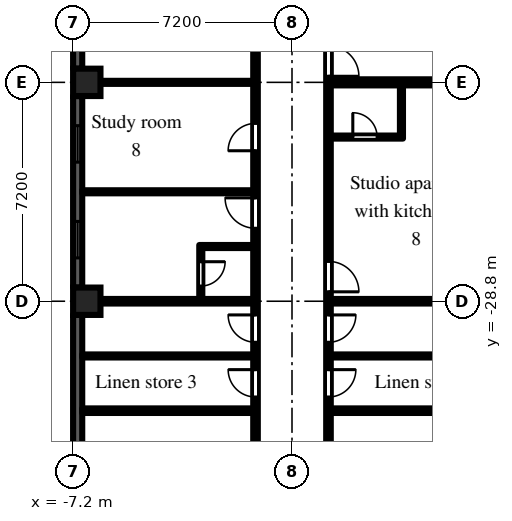
"""IFC4 building model, lengths in metres.
Left out: names, types, materials, properties, quantities, classifications, styles, units other than length and angle.
Written with IfcOpenShell. Run it as: python <this file> out.ifc"""

import sys

from ifc_helpers import new_model, si_unit, direction, frame, frame_2d, origin, origin_2d, place, context, subcontext, project, spatial, rectangle, extrude, element, fill, save


model = new_model("IFC4")
c1 = context("Model", 3, precision=1e-05, world=origin(), true_north=direction((0.0, 1.0)))
c2 = subcontext(c1, "Body", "Model", "MODEL_VIEW")
j1 = project(units=[si_unit("LENGTHUNIT", "METRE"), si_unit("PLANEANGLEUNIT", "RADIAN")], contexts=[c1])
p1 = place(None, origin())
s1 = spatial("IfcSite", under=j1, at=p1, CompositionType="ELEMENT")
p2 = place(p1, origin())
s2 = spatial("IfcBuilding", under=s1, at=p2, CompositionType="ELEMENT")
p3 = place(p2, frame((0.0, 0.0, 35.7)))
s3 = spatial("IfcBuildingStorey", under=s2, at=p3, CompositionType="ELEMENT", Elevation=35.7)
for number, where, z_axis, x_axis in (
    (1, (-6.75, -28.8, 0.0), (0.0, 0.0, 1.0), (1.0, 0.0, 0.0)),
    (2, (-6.75, -21.6, 0.0), (0.0, 0.0, 1.0), (1.0, 0.0, 0.0)),
):
    element("IfcColumn", number, at=place(p3, frame(where, z_axis=z_axis, x_axis=x_axis)), inside=s3, PredefinedType="COLUMN", context=c2, shape_type="SweptSolid", body=[
        extrude(rectangle(XDim=0.9, YDim=0.9, at=origin_2d()), origin(), (0.0, 0.0, 1.0), 3.0),
    ])
p4 = place(p3, frame((-7.05, -18.0, 0.0), z_axis=(0.0, 0.0, 1.0), x_axis=(0.0, -1.0, 0.0)))
e3 = element("IfcWall", 3, at=p4, inside=s3, PredefinedType="SOLIDWALL", context=c2, shape_type="SweptSolid", body=[
    extrude(rectangle(XDim=3.15, YDim=0.3, at=frame_2d((1.575, 0.0))), origin(), (0.0, 0.0, 1.0), 2.1),
])
p5 = place(p4, frame((0.975, 0.0, 0.2)))
e4 = element("IfcOpeningElement", 4, at=p5, cuts=e3, PredefinedType="OPENING", context=c2, shape_type="SweptSolid", body=[
    extrude(rectangle(XDim=1.2, YDim=1.85, at=frame_2d((0.6, 0.925))), frame((0.0, 0.16, 0.0), z_axis=(0.0, -1.0, 0.0), x_axis=(1.0, 0.0, 0.0)), (0.0, 0.0, 1.0), 0.32),
])
p6 = place(p3, frame((-7.05, -22.05, 0.0), z_axis=(0.0, 0.0, 1.0), x_axis=(0.0, -1.0, 0.0)))
e5 = element("IfcWall", 5, at=p6, inside=s3, PredefinedType="SOLIDWALL", context=c2, shape_type="SweptSolid", body=[
    extrude(rectangle(XDim=6.3, YDim=0.3, at=frame_2d((3.15, 0.0))), origin(), (0.0, 0.0, 1.0), 2.1),
])
p7 = place(p6, frame((0.975, 0.0, 0.2)))
e6 = element("IfcOpeningElement", 6, at=p7, cuts=e5, PredefinedType="OPENING", context=c2, shape_type="SweptSolid", body=[
    extrude(rectangle(XDim=1.2, YDim=1.85, at=frame_2d((0.6, 0.925))), frame((0.0, 0.16, 0.0), z_axis=(0.0, -1.0, 0.0), x_axis=(1.0, 0.0, 0.0)), (0.0, 0.0, 1.0), 0.32),
])
p8 = place(p6, frame((4.125, 0.0, 0.2)))
e7 = element("IfcOpeningElement", 7, at=p8, cuts=e5, PredefinedType="OPENING", context=c2, shape_type="SweptSolid", body=[
    extrude(rectangle(XDim=1.2, YDim=1.85, at=frame_2d((0.6, 0.925))), frame((0.0, 0.16, 0.0), z_axis=(0.0, -1.0, 0.0), x_axis=(1.0, 0.0, 0.0)), (0.0, 0.0, 1.0), 0.32),
])
p9 = place(p3, frame((-7.05, -29.25, 0.0), z_axis=(0.0, 0.0, 1.0), x_axis=(0.0, -1.0, 0.0)))
e8 = element("IfcWall", 8, at=p9, inside=s3, PredefinedType="SOLIDWALL", context=c2, shape_type="SweptSolid", body=[
    extrude(rectangle(XDim=6.3, YDim=0.3, at=frame_2d((3.15, 0.0))), origin(), (0.0, 0.0, 1.0), 2.1),
])
p10 = place(p3, frame((-6.9, -32.4, 0.0), z_axis=(0.0, 0.0, 1.0), x_axis=(1.0, 0.0, 0.0)))
e9 = element("IfcWall", 9, at=p10, inside=s3, PredefinedType="PARTITIONING", context=c2, shape_type="SweptSolid", body=[
    extrude(rectangle(XDim=5.625, YDim=0.15, at=frame_2d((2.812, 0.0))), origin(), (0.0, 0.0, 1.0), 2.575),
])
p11 = place(p3, frame((-6.9, -30.6, 0.0), z_axis=(0.0, 0.0, 1.0), x_axis=(1.0, 0.0, 0.0)))
e10 = element("IfcWall", 10, at=p11, inside=s3, PredefinedType="PARTITIONING", context=c2, shape_type="SweptSolid", body=[
    extrude(rectangle(XDim=5.625, YDim=0.1, at=frame_2d((2.812, 0.0))), origin(), (0.0, 0.0, 1.0), 2.575),
])
p12 = place(p3, frame((-6.9, -28.8, 0.0), z_axis=(0.0, 0.0, 1.0), x_axis=(1.0, 0.0, 0.0)))
e11 = element("IfcWall", 11, at=p12, inside=s3, PredefinedType="PARTITIONING", context=c2, shape_type="SweptSolid", body=[
    extrude(rectangle(XDim=5.625, YDim=0.15, at=frame_2d((2.812, 0.0))), origin(), (0.0, 0.0, 1.0), 2.575),
])
for number, where, z_axis, x_axis in (
    (12, (-6.9, -25.2, 0.0), (0.0, 0.0, 1.0), (1.0, 0.0, 0.0)),
    (13, (-6.9, -21.6, 0.0), (0.0, 0.0, 1.0), (1.0, 0.0, 0.0)),
):
    element("IfcWall", number, at=place(p3, frame(where, z_axis=z_axis, x_axis=x_axis)), inside=s3, PredefinedType="PARTITIONING", context=c2, shape_type="SweptSolid", body=[
        extrude(rectangle(XDim=5.625, YDim=0.1, at=frame_2d((2.812, 0.0))), origin(), (0.0, 0.0, 1.0), 2.575),
    ])
p13 = place(p3, frame((-3.0, -28.725, 0.0), z_axis=(0.0, 0.0, 1.0), x_axis=(0.0, 1.0, 0.0)))
e14 = element("IfcWall", 14, at=p13, inside=s3, PredefinedType="PARTITIONING", context=c2, shape_type="SweptSolid", body=[
    extrude(rectangle(XDim=1.775, YDim=0.1, at=frame_2d((0.888, 0.0))), origin(), (0.0, 0.0, 1.0), 2.575),
])
p14 = place(p13, frame((0.425, 0.0, 0.0)))
e15 = element("IfcOpeningElement", 15, at=p14, cuts=e14, PredefinedType="OPENING", context=c2, shape_type="SweptSolid", body=[
    extrude(rectangle(XDim=0.8, YDim=2.1, at=frame_2d((0.4, 1.05))), frame((0.0, 0.06, 0.0), z_axis=(0.0, -1.0, 0.0), x_axis=(1.0, 0.0, 0.0)), (0.0, 0.0, 1.0), 0.12),
])
p15 = place(p3, frame((-2.95, -27.0, 0.0), z_axis=(0.0, 0.0, 1.0), x_axis=(1.0, 0.0, 0.0)))
e16 = element("IfcWall", 16, at=p15, inside=s3, PredefinedType="PARTITIONING", context=c2, shape_type="SweptSolid", body=[
    extrude(rectangle(XDim=1.675, YDim=0.1, at=frame_2d((0.837, 0.0))), origin(), (0.0, 0.0, 1.0), 2.575),
])
p16 = place(p3, frame((-1.2, -36.5, 0.0), z_axis=(0.0, 0.0, 1.0), x_axis=(0.0, 1.0, 0.0)))
e17 = element("IfcWall", 17, at=p16, inside=s3, PredefinedType="PARTITIONING", context=c2, shape_type="SweptSolid", body=[
    extrude(rectangle(XDim=35.225, YDim=0.15, at=frame_2d((17.613, 0.0))), origin(), (0.0, 0.0, 1.0), 2.575),
])
p17 = place(p16, frame((33.65, 0.0, 0.0)))
e18 = element("IfcOpeningElement", 18, at=p17, cuts=e17, PredefinedType="OPENING", context=c2, shape_type="SweptSolid", body=[
    extrude(rectangle(XDim=0.9, YDim=2.1, at=frame_2d((0.45, 1.05))), frame((0.0, 0.085, 0.0), z_axis=(0.0, -1.0, 0.0), x_axis=(1.0, 0.0, 0.0)), (0.0, 0.0, 1.0), 0.17),
])
p18 = place(p16, frame((30.65, 0.0, 0.0)))
e19 = element("IfcOpeningElement", 19, at=p18, cuts=e17, PredefinedType="OPENING", context=c2, shape_type="SweptSolid", body=[
    extrude(rectangle(XDim=0.9, YDim=2.1, at=frame_2d((0.45, 1.05))), frame((0.0, 0.085, 0.0), z_axis=(0.0, -1.0, 0.0), x_axis=(1.0, 0.0, 0.0)), (0.0, 0.0, 1.0), 0.17),
])
p19 = place(p16, frame((23.05, 0.0, 0.0)))
e20 = element("IfcOpeningElement", 20, at=p19, cuts=e17, PredefinedType="OPENING", context=c2, shape_type="SweptSolid", body=[
    extrude(rectangle(XDim=0.9, YDim=2.1, at=frame_2d((0.45, 1.05))), frame((0.0, 0.085, 0.0), z_axis=(0.0, -1.0, 0.0), x_axis=(1.0, 0.0, 0.0)), (0.0, 0.0, 1.0), 0.17),
])
p20 = place(p16, frame((26.65, 0.0, 0.0)))
e21 = element("IfcOpeningElement", 21, at=p20, cuts=e17, PredefinedType="OPENING", context=c2, shape_type="SweptSolid", body=[
    extrude(rectangle(XDim=0.9, YDim=2.1, at=frame_2d((0.45, 1.05))), frame((0.0, 0.085, 0.0), z_axis=(0.0, -1.0, 0.0), x_axis=(1.0, 0.0, 0.0)), (0.0, 0.0, 1.0), 0.17),
])
p21 = place(p16, frame((17.3, 0.0, 0.0)))
e22 = element("IfcOpeningElement", 22, at=p21, cuts=e17, PredefinedType="OPENING", context=c2, shape_type="SweptSolid", body=[
    extrude(rectangle(XDim=1.0, YDim=2.1, at=frame_2d((0.5, 1.05))), frame((0.0, 0.085, 0.0), z_axis=(0.0, -1.0, 0.0), x_axis=(1.0, 0.0, 0.0)), (0.0, 0.0, 1.0), 0.17),
])
p22 = place(p16, frame((12.65, 0.0, 0.0)))
e23 = element("IfcOpeningElement", 23, at=p22, cuts=e17, PredefinedType="OPENING", context=c2, shape_type="SweptSolid", body=[
    extrude(rectangle(XDim=0.9, YDim=2.1, at=frame_2d((0.45, 1.05))), frame((0.0, 0.085, 0.0), z_axis=(0.0, -1.0, 0.0), x_axis=(1.0, 0.0, 0.0)), (0.0, 0.0, 1.0), 0.17),
])
p23 = place(p16, frame((10.1, 0.0, 0.0)))
e24 = element("IfcOpeningElement", 24, at=p23, cuts=e17, PredefinedType="OPENING", context=c2, shape_type="SweptSolid", body=[
    extrude(rectangle(XDim=1.0, YDim=2.1, at=frame_2d((0.5, 1.05))), frame((0.0, 0.085, 0.0), z_axis=(0.0, -1.0, 0.0), x_axis=(1.0, 0.0, 0.0)), (0.0, 0.0, 1.0), 0.17),
])
p24 = place(p16, frame((6.35, 0.0, 0.0)))
e25 = element("IfcOpeningElement", 25, at=p24, cuts=e17, PredefinedType="OPENING", context=c2, shape_type="SweptSolid", body=[
    extrude(rectangle(XDim=0.9, YDim=2.1, at=frame_2d((0.45, 1.05))), frame((0.0, 0.085, 0.0), z_axis=(0.0, -1.0, 0.0), x_axis=(1.0, 0.0, 0.0)), (0.0, 0.0, 1.0), 0.17),
])
p25 = place(p16, frame((4.55, 0.0, 0.0)))
e26 = element("IfcOpeningElement", 26, at=p25, cuts=e17, PredefinedType="OPENING", context=c2, shape_type="SweptSolid", body=[
    extrude(rectangle(XDim=0.9, YDim=2.1, at=frame_2d((0.45, 1.05))), frame((0.0, 0.085, 0.0), z_axis=(0.0, -1.0, 0.0), x_axis=(1.0, 0.0, 0.0)), (0.0, 0.0, 1.0), 0.17),
])
p26 = place(p16, frame((1.15, 0.0, 0.0)))
e27 = element("IfcOpeningElement", 27, at=p26, cuts=e17, PredefinedType="OPENING", context=c2, shape_type="SweptSolid", body=[
    extrude(rectangle(XDim=1.8, YDim=2.1, at=frame_2d((0.9, 1.05))), frame((0.0, 0.085, 0.0), z_axis=(0.0, -1.0, 0.0), x_axis=(1.0, 0.0, 0.0)), (0.0, 0.0, 1.0), 0.17),
])
p27 = place(p3, frame((1.2, -36.5, 0.0), z_axis=(0.0, 0.0, 1.0), x_axis=(0.0, 1.0, 0.0)))
e28 = element("IfcWall", 28, at=p27, inside=s3, PredefinedType="PARTITIONING", context=c2, shape_type="SweptSolid", body=[
    extrude(rectangle(XDim=35.375, YDim=0.15, at=frame_2d((17.688, 0.0))), origin(), (0.0, 0.0, 1.0), 2.575),
])
p28 = place(p27, frame((31.85, 0.0, 0.0)))
e29 = element("IfcOpeningElement", 29, at=p28, cuts=e28, PredefinedType="OPENING", context=c2, shape_type="SweptSolid", body=[
    extrude(rectangle(XDim=0.9, YDim=2.1, at=frame_2d((0.45, 1.05))), frame((0.0, 0.085, 0.0), z_axis=(0.0, -1.0, 0.0), x_axis=(1.0, 0.0, 0.0)), (0.0, 0.0, 1.0), 0.17),
])
p29 = place(p27, frame((27.45, 0.0, 0.0)))
e30 = element("IfcOpeningElement", 30, at=p29, cuts=e28, PredefinedType="OPENING", context=c2, shape_type="SweptSolid", body=[
    extrude(rectangle(XDim=0.9, YDim=2.1, at=frame_2d((0.45, 1.05))), frame((0.0, 0.085, 0.0), z_axis=(0.0, -1.0, 0.0), x_axis=(1.0, 0.0, 0.0)), (0.0, 0.0, 1.0), 0.17),
])
p30 = place(p27, frame((23.85, 0.0, 0.0)))
e31 = element("IfcOpeningElement", 31, at=p30, cuts=e28, PredefinedType="OPENING", context=c2, shape_type="SweptSolid", body=[
    extrude(rectangle(XDim=0.9, YDim=2.1, at=frame_2d((0.45, 1.05))), frame((0.0, 0.085, 0.0), z_axis=(0.0, -1.0, 0.0), x_axis=(1.0, 0.0, 0.0)), (0.0, 0.0, 1.0), 0.17),
])
p31 = place(p27, frame((15.1, 0.0, 0.0)))
e32 = element("IfcOpeningElement", 32, at=p31, cuts=e28, PredefinedType="OPENING", context=c2, shape_type="SweptSolid", body=[
    extrude(rectangle(XDim=1.0, YDim=2.1, at=frame_2d((0.5, 1.05))), frame((0.0, 0.085, 0.0), z_axis=(0.0, -1.0, 0.0), x_axis=(1.0, 0.0, 0.0)), (0.0, 0.0, 1.0), 0.17),
])
p32 = place(p27, frame((8.01, 0.0, 0.0)))
e33 = element("IfcOpeningElement", 33, at=p32, cuts=e28, PredefinedType="OPENING", context=c2, shape_type="SweptSolid", body=[
    extrude(rectangle(XDim=1.0, YDim=2.1, at=frame_2d((0.5, 1.05))), frame((0.0, 0.085, 0.0), z_axis=(0.0, -1.0, 0.0), x_axis=(1.0, 0.0, 0.0)), (0.0, 0.0, 1.0), 0.17),
])
p33 = place(p27, frame((6.35, 0.0, 0.0)))
e34 = element("IfcOpeningElement", 34, at=p33, cuts=e28, PredefinedType="OPENING", context=c2, shape_type="SweptSolid", body=[
    extrude(rectangle(XDim=0.9, YDim=2.1, at=frame_2d((0.45, 1.05))), frame((0.0, 0.085, 0.0), z_axis=(0.0, -1.0, 0.0), x_axis=(1.0, 0.0, 0.0)), (0.0, 0.0, 1.0), 0.17),
])
p34 = place(p27, frame((4.55, 0.0, 0.0)))
e35 = element("IfcOpeningElement", 35, at=p34, cuts=e28, PredefinedType="OPENING", context=c2, shape_type="SweptSolid", body=[
    extrude(rectangle(XDim=0.9, YDim=2.1, at=frame_2d((0.45, 1.05))), frame((0.0, 0.085, 0.0), z_axis=(0.0, -1.0, 0.0), x_axis=(1.0, 0.0, 0.0)), (0.0, 0.0, 1.0), 0.17),
])
p35 = place(p27, frame((1.15, 0.0, 0.0)))
e36 = element("IfcOpeningElement", 36, at=p35, cuts=e28, PredefinedType="OPENING", context=c2, shape_type="SweptSolid", body=[
    extrude(rectangle(XDim=1.8, YDim=2.1, at=frame_2d((0.9, 1.05))), frame((0.0, 0.085, 0.0), z_axis=(0.0, -1.0, 0.0), x_axis=(1.0, 0.0, 0.0)), (0.0, 0.0, 1.0), 0.17),
])
p36 = place(p3, frame((1.275, -32.4, 0.0), z_axis=(0.0, 0.0, 1.0), x_axis=(1.0, 0.0, 0.0)))
e37 = element("IfcWall", 37, at=p36, inside=s3, PredefinedType="PARTITIONING", context=c2, shape_type="SweptSolid", body=[
    extrude(rectangle(XDim=5.625, YDim=0.15, at=frame_2d((2.812, 0.0))), origin(), (0.0, 0.0, 1.0), 2.575),
])
p37 = place(p3, frame((1.275, -30.6, 0.0), z_axis=(0.0, 0.0, 1.0), x_axis=(1.0, 0.0, 0.0)))
e38 = element("IfcWall", 38, at=p37, inside=s3, PredefinedType="PARTITIONING", context=c2, shape_type="SweptSolid", body=[
    extrude(rectangle(XDim=5.625, YDim=0.1, at=frame_2d((2.812, 0.0))), origin(), (0.0, 0.0, 1.0), 2.575),
])
p38 = place(p3, frame((1.275, -28.8, 0.0), z_axis=(0.0, 0.0, 1.0), x_axis=(1.0, 0.0, 0.0)))
e39 = element("IfcWall", 39, at=p38, inside=s3, PredefinedType="PARTITIONING", context=c2, shape_type="SweptSolid", body=[
    extrude(rectangle(XDim=5.625, YDim=0.15, at=frame_2d((2.812, 0.0))), origin(), (0.0, 0.0, 1.0), 2.575),
])
p39 = place(p3, frame((1.275, -23.4, 0.0), z_axis=(0.0, 0.0, 1.0), x_axis=(1.0, 0.0, 0.0)))
e40 = element("IfcWall", 40, at=p39, inside=s3, PredefinedType="PARTITIONING", context=c2, shape_type="SweptSolid", body=[
    extrude(rectangle(XDim=2.375, YDim=0.1, at=frame_2d((1.188, 0.0))), origin(), (0.0, 0.0, 1.0), 2.575),
])
p40 = place(p39, frame((0.725, 0.0, 0.0)))
e41 = element("IfcOpeningElement", 41, at=p40, cuts=e40, PredefinedType="OPENING", context=c2, shape_type="SweptSolid", body=[
    extrude(rectangle(XDim=0.8, YDim=2.1, at=frame_2d((0.4, 1.05))), frame((0.0, 0.06, 0.0), z_axis=(0.0, -1.0, 0.0), x_axis=(1.0, 0.0, 0.0)), (0.0, 0.0, 1.0), 0.12),
])
p41 = place(p3, frame((1.275, -21.6, 0.0), z_axis=(0.0, 0.0, 1.0), x_axis=(1.0, 0.0, 0.0)))
e42 = element("IfcWall", 42, at=p41, inside=s3, PredefinedType="PARTITIONING", context=c2, shape_type="SweptSolid", body=[
    extrude(rectangle(XDim=5.625, YDim=0.2, at=frame_2d((2.812, 0.0))), origin(), (0.0, 0.0, 1.0), 2.575),
])
p42 = place(p3, frame((3.6, -23.35, 0.0), z_axis=(0.0, 0.0, 1.0), x_axis=(0.0, 1.0, 0.0)))
e43 = element("IfcWall", 43, at=p42, inside=s3, PredefinedType="PARTITIONING", context=c2, shape_type="SweptSolid", body=[
    extrude(rectangle(XDim=1.65, YDim=0.1, at=frame_2d((0.825, 0.0))), origin(), (0.0, 0.0, 1.0), 2.575),
])
p43 = place(p7, origin())
e44 = element("IfcWindow", 44, at=p43, inside=s3, PartitioningType="SINGLE_PANEL", PredefinedType="WINDOW", context=c2, shape_type="SweptSolid", body=[
    extrude(rectangle(XDim=1.2, YDim=1.85, at=frame_2d((0.6, 0.925))), frame((0.0, 0.03, 0.0), z_axis=(0.0, -1.0, 0.0), x_axis=(1.0, 0.0, 0.0)), (0.0, 0.0, 1.0), 0.06),
])
fill(e6, e44)
p44 = place(p8, origin())
e45 = element("IfcWindow", 45, at=p44, inside=s3, PartitioningType="SINGLE_PANEL", PredefinedType="WINDOW", context=c2, shape_type="SweptSolid", body=[
    extrude(rectangle(XDim=1.2, YDim=1.85, at=frame_2d((0.6, 0.925))), frame((0.0, 0.03, 0.0), z_axis=(0.0, -1.0, 0.0), x_axis=(1.0, 0.0, 0.0)), (0.0, 0.0, 1.0), 0.06),
])
fill(e7, e45)
p45 = place(p31, frame((1.0, 0.0, 0.0), z_axis=(0.0, 0.0, 1.0), x_axis=(-1.0, 0.0, 0.0)))
e46 = element("IfcDoor", 46, at=p45, inside=s3, OperationType="SINGLE_SWING_RIGHT", PredefinedType="DOOR", context=c2, shape_type="SweptSolid", body=[
    extrude(rectangle(XDim=1.0, YDim=2.1, at=frame_2d((0.5, 1.05))), frame((0.0, 0.025, 0.0), z_axis=(0.0, -1.0, 0.0), x_axis=(1.0, 0.0, 0.0)), (0.0, 0.0, 1.0), 0.05),
])
fill(e32, e46)
p46 = place(p40, origin())
e47 = element("IfcDoor", 47, at=p46, inside=s3, OperationType="SINGLE_SWING_LEFT", PredefinedType="DOOR", context=c2, shape_type="SweptSolid", body=[
    extrude(rectangle(XDim=0.8, YDim=2.1, at=frame_2d((0.4, 1.05))), frame((0.0, 0.025, 0.0), z_axis=(0.0, -1.0, 0.0), x_axis=(1.0, 0.0, 0.0)), (0.0, 0.0, 1.0), 0.05),
])
fill(e41, e47)
p47 = place(p32, frame((1.0, 0.0, 0.0), z_axis=(0.0, 0.0, 1.0), x_axis=(-1.0, 0.0, 0.0)))
e48 = element("IfcDoor", 48, at=p47, inside=s3, OperationType="SINGLE_SWING_RIGHT", PredefinedType="DOOR", context=c2, shape_type="SweptSolid", body=[
    extrude(rectangle(XDim=1.0, YDim=2.1, at=frame_2d((0.5, 1.05))), frame((0.0, 0.025, 0.0), z_axis=(0.0, -1.0, 0.0), x_axis=(1.0, 0.0, 0.0)), (0.0, 0.0, 1.0), 0.05),
])
fill(e33, e48)
p48 = place(p33, frame((0.9, 0.0, 0.0), z_axis=(0.0, 0.0, 1.0), x_axis=(-1.0, 0.0, 0.0)))
e49 = element("IfcDoor", 49, at=p48, inside=s3, OperationType="SINGLE_SWING_LEFT", PredefinedType="DOOR", context=c2, shape_type="SweptSolid", body=[
    extrude(rectangle(XDim=0.9, YDim=2.1, at=frame_2d((0.45, 1.05))), frame((0.0, 0.025, 0.0), z_axis=(0.0, -1.0, 0.0), x_axis=(1.0, 0.0, 0.0)), (0.0, 0.0, 1.0), 0.05),
])
fill(e34, e49)
p49 = place(p34, frame((0.9, 0.0, 0.0), z_axis=(0.0, 0.0, 1.0), x_axis=(-1.0, 0.0, 0.0)))
e50 = element("IfcDoor", 50, at=p49, inside=s3, OperationType="SINGLE_SWING_LEFT", PredefinedType="DOOR", context=c2, shape_type="SweptSolid", body=[
    extrude(rectangle(XDim=0.9, YDim=2.1, at=frame_2d((0.45, 1.05))), frame((0.0, 0.025, 0.0), z_axis=(0.0, -1.0, 0.0), x_axis=(1.0, 0.0, 0.0)), (0.0, 0.0, 1.0), 0.05),
])
fill(e35, e50)
p50 = place(p22, origin())
e51 = element("IfcDoor", 51, at=p50, inside=s3, OperationType="SINGLE_SWING_LEFT", PredefinedType="DOOR", context=c2, shape_type="SweptSolid", body=[
    extrude(rectangle(XDim=0.9, YDim=2.1, at=frame_2d((0.45, 1.05))), frame((0.0, 0.025, 0.0), z_axis=(0.0, -1.0, 0.0), x_axis=(1.0, 0.0, 0.0)), (0.0, 0.0, 1.0), 0.05),
])
fill(e23, e51)
p51 = place(p14, frame((0.8, 0.0, 0.0), z_axis=(0.0, 0.0, 1.0), x_axis=(-1.0, 0.0, 0.0)))
e52 = element("IfcDoor", 52, at=p51, inside=s3, OperationType="SINGLE_SWING_LEFT", PredefinedType="DOOR", context=c2, shape_type="SweptSolid", body=[
    extrude(rectangle(XDim=0.8, YDim=2.1, at=frame_2d((0.4, 1.05))), frame((0.0, 0.025, 0.0), z_axis=(0.0, -1.0, 0.0), x_axis=(1.0, 0.0, 0.0)), (0.0, 0.0, 1.0), 0.05),
])
fill(e15, e52)
p52 = place(p23, origin())
e53 = element("IfcDoor", 53, at=p52, inside=s3, OperationType="SINGLE_SWING_RIGHT", PredefinedType="DOOR", context=c2, shape_type="SweptSolid", body=[
    extrude(rectangle(XDim=1.0, YDim=2.1, at=frame_2d((0.5, 1.05))), frame((0.0, 0.025, 0.0), z_axis=(0.0, -1.0, 0.0), x_axis=(1.0, 0.0, 0.0)), (0.0, 0.0, 1.0), 0.05),
])
fill(e24, e53)
p53 = place(p24, origin())
e54 = element("IfcDoor", 54, at=p53, inside=s3, OperationType="SINGLE_SWING_RIGHT", PredefinedType="DOOR", context=c2, shape_type="SweptSolid", body=[
    extrude(rectangle(XDim=0.9, YDim=2.1, at=frame_2d((0.45, 1.05))), frame((0.0, 0.025, 0.0), z_axis=(0.0, -1.0, 0.0), x_axis=(1.0, 0.0, 0.0)), (0.0, 0.0, 1.0), 0.05),
])
fill(e25, e54)
p54 = place(p25, origin())
e55 = element("IfcDoor", 55, at=p54, inside=s3, OperationType="SINGLE_SWING_RIGHT", PredefinedType="DOOR", context=c2, shape_type="SweptSolid", body=[
    extrude(rectangle(XDim=0.9, YDim=2.1, at=frame_2d((0.45, 1.05))), frame((0.0, 0.025, 0.0), z_axis=(0.0, -1.0, 0.0), x_axis=(1.0, 0.0, 0.0)), (0.0, 0.0, 1.0), 0.05),
])
fill(e26, e55)
save(model, sys.argv[1])
